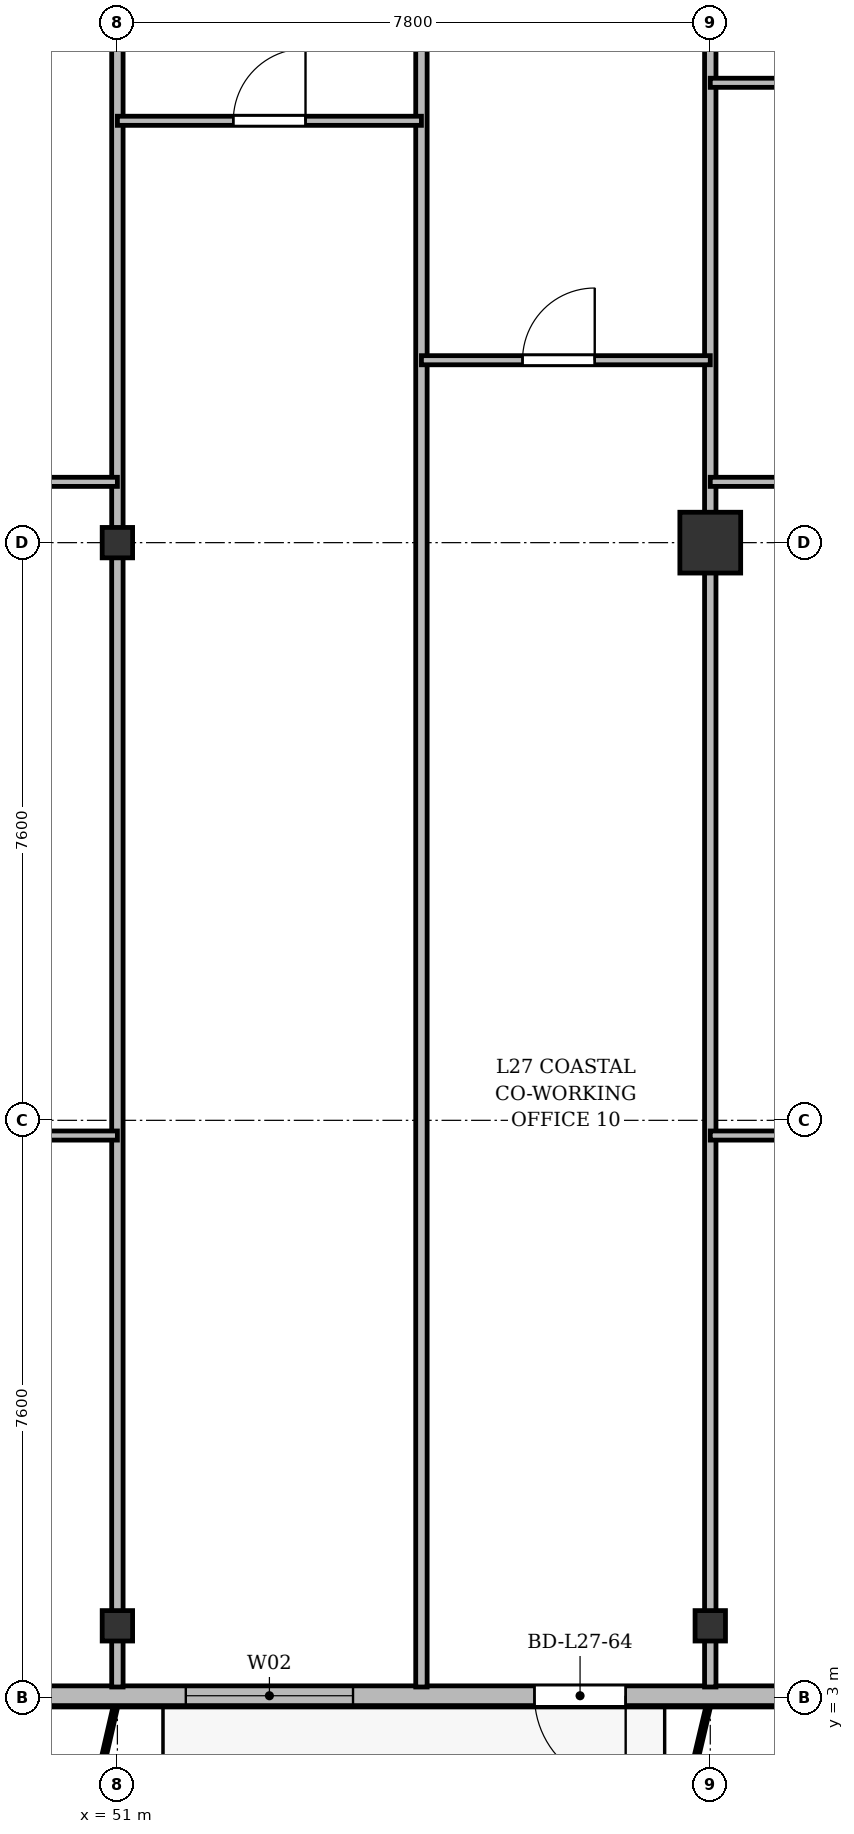
"""IFC4 building model, lengths in metres.
Left out: names, types, materials, properties, quantities, classifications, styles, units other than length and angle.
Written with IfcOpenShell. Run it as: python <this file> out.ifc"""

import sys

from ifc_helpers import new_model, si_unit, direction, frame, frame_2d, origin, origin_2d, place, context, subcontext, project, spatial, rectangle, i_section, extrude, source, transform, mapped, element, fill, save


model = new_model("IFC4")
c1 = context("Model", 3, precision=1e-05, world=origin(), true_north=direction((0.0, 1.0)))
c2 = subcontext(c1, "Body", "Model", "MODEL_VIEW")
j1 = project(units=[si_unit("LENGTHUNIT", "METRE"), si_unit("PLANEANGLEUNIT", "RADIAN")], contexts=[c1])
p1 = place(None, origin())
s1 = spatial("IfcSite", under=j1, at=p1, CompositionType="ELEMENT")
p2 = place(p1, origin())
s2 = spatial("IfcBuilding", under=s1, at=p2, CompositionType="ELEMENT")
p3 = place(p2, frame((0.0, 0.0, 106.9)))
s3 = spatial("IfcBuildingStorey", under=s2, at=p3, CompositionType="ELEMENT", Elevation=106.9)
m1 = source(origin(), c2, "Body", "SweptSolid", [
    extrude(i_section(OverallWidth=0.4, OverallDepth=0.4, WebThickness=0.022, FlangeThickness=0.035, at=origin_2d()), origin(), (0.0, 0.0, 1.0), 3.6),
])
for number, where, z_axis, x_axis in (
    (1, (51.0, 3.95, 0.0), (0.0, 0.0, 1.0), (1.0, 0.0, 0.0)),
    (2, (51.0, 18.2, 0.0), (0.0, 0.0, 1.0), (1.0, 0.0, 0.0)),
    (3, (58.8, 3.95, 0.0), (0.0, 0.0, 1.0), (1.0, 0.0, 0.0)),
):
    element("IfcColumn", number, at=place(p3, frame(where, z_axis=z_axis, x_axis=x_axis)), inside=s3, PredefinedType="COLUMN", context=c2, shape_type="MappedRepresentation", body=[
        mapped(m1, transform((0.0, 0.0, 0.0), x_axis=(1.0, 0.0, 0.0), y_axis=(0.0, 1.0, 0.0), z_axis=(0.0, 0.0, 1.0), scale=1.0)),
    ])
m2 = source(origin(), c2, "Body", "SweptSolid", [
    extrude(rectangle(XDim=0.8, YDim=0.8, at=origin_2d()), origin(), (0.0, 0.0, 1.0), 3.6),
])
p4 = place(p3, frame((58.8, 18.2, 0.0), z_axis=(0.0, 0.0, 1.0), x_axis=(1.0, 0.0, 0.0)))
e4 = element("IfcColumn", 4, at=p4, inside=s3, PredefinedType="COLUMN", context=c2, shape_type="MappedRepresentation", body=[
    mapped(m2, transform((0.0, 0.0, 0.0), x_axis=(1.0, 0.0, 0.0), y_axis=(0.0, 1.0, 0.0), z_axis=(0.0, 0.0, 1.0), scale=1.0)),
])
p5 = place(p3, frame((66.9, 3.03, 0.0), z_axis=(0.0, 0.0, 1.0), x_axis=(-1.0, 0.0, 0.0)))
e5 = element("IfcWall", 5, at=p5, inside=s3, PredefinedType="SOLIDWALL", context=c2, shape_type="SweptSolid", body=[
    extrude(rectangle(XDim=59.4, YDim=0.26, at=frame_2d((29.7, 0.0))), origin(), (0.0, 0.0, 1.0), 3.34),
])
p6 = place(p5, frame((2.0, 0.0, 0.9)))
e6 = element("IfcOpeningElement", 6, at=p6, cuts=e5, PredefinedType="OPENING", context=c2, shape_type="SweptSolid", body=[
    extrude(rectangle(XDim=2.0, YDim=1.95, at=frame_2d((1.0, 0.975))), frame((0.0, 0.14, 0.0), z_axis=(0.0, -1.0, 0.0), x_axis=(1.0, 0.0, 0.0)), (0.0, 0.0, 1.0), 0.28),
])
p7 = place(p5, frame((5.575, 0.0, 0.9)))
e7 = element("IfcOpeningElement", 7, at=p7, cuts=e5, PredefinedType="OPENING", context=c2, shape_type="SweptSolid", body=[
    extrude(rectangle(XDim=1.65, YDim=1.85, at=frame_2d((0.825, 0.925))), frame((0.0, 0.14, 0.0), z_axis=(0.0, -1.0, 0.0), x_axis=(1.0, 0.0, 0.0)), (0.0, 0.0, 1.0), 0.28),
])
p8 = place(p5, frame((9.213, 0.0, 0.0)))
e8 = element("IfcOpeningElement", 8, at=p8, cuts=e5, PredefinedType="OPENING", context=c2, shape_type="SweptSolid", body=[
    extrude(rectangle(XDim=1.2, YDim=2.2, at=frame_2d((0.6, 1.1))), frame((0.0, 0.14, 0.0), z_axis=(0.0, -1.0, 0.0), x_axis=(1.0, 0.0, 0.0)), (0.0, 0.0, 1.0), 0.28),
])
p9 = place(p5, frame((12.8, 0.0, 0.9)))
e9 = element("IfcOpeningElement", 9, at=p9, cuts=e5, PredefinedType="OPENING", context=c2, shape_type="SweptSolid", body=[
    extrude(rectangle(XDim=2.2, YDim=1.8, at=frame_2d((1.1, 0.9))), frame((0.0, 0.14, 0.0), z_axis=(0.0, -1.0, 0.0), x_axis=(1.0, 0.0, 0.0)), (0.0, 0.0, 1.0), 0.28),
])
p10 = place(p5, frame((16.95, 0.0, 0.9)))
e10 = element("IfcOpeningElement", 10, at=p10, cuts=e5, PredefinedType="OPENING", context=c2, shape_type="SweptSolid", body=[
    extrude(rectangle(XDim=1.5, YDim=1.75, at=frame_2d((0.75, 0.875))), frame((0.0, 0.14, 0.0), z_axis=(0.0, -1.0, 0.0), x_axis=(1.0, 0.0, 0.0)), (0.0, 0.0, 1.0), 0.28),
])
p11 = place(p5, frame((20.3, 0.0, 0.9)))
e11 = element("IfcOpeningElement", 11, at=p11, cuts=e5, PredefinedType="OPENING", context=c2, shape_type="SweptSolid", body=[
    extrude(rectangle(XDim=2.0, YDim=1.95, at=frame_2d((1.0, 0.975))), frame((0.0, 0.14, 0.0), z_axis=(0.0, -1.0, 0.0), x_axis=(1.0, 0.0, 0.0)), (0.0, 0.0, 1.0), 0.28),
])
p12 = place(p5, frame((25.575, 0.0, 0.9)))
e12 = element("IfcOpeningElement", 12, at=p12, cuts=e5, PredefinedType="OPENING", context=c2, shape_type="SweptSolid", body=[
    extrude(rectangle(XDim=1.65, YDim=1.85, at=frame_2d((0.825, 0.925))), frame((0.0, 0.14, 0.0), z_axis=(0.0, -1.0, 0.0), x_axis=(1.0, 0.0, 0.0)), (0.0, 0.0, 1.0), 0.28),
])
p13 = place(p5, frame((32.1, 0.0, 0.9)))
e13 = element("IfcOpeningElement", 13, at=p13, cuts=e5, PredefinedType="OPENING", context=c2, shape_type="SweptSolid", body=[
    extrude(rectangle(XDim=1.8, YDim=1.8, at=frame_2d((0.9, 0.9))), frame((0.0, 0.14, 0.0), z_axis=(0.0, -1.0, 0.0), x_axis=(1.0, 0.0, 0.0)), (0.0, 0.0, 1.0), 0.28),
])
p14 = place(p5, frame((37.584, 0.0, 0.0)))
e14 = element("IfcOpeningElement", 14, at=p14, cuts=e5, PredefinedType="OPENING", context=c2, shape_type="SweptSolid", body=[
    extrude(rectangle(XDim=1.2, YDim=2.2, at=frame_2d((0.6, 1.1))), frame((0.0, 0.14, 0.0), z_axis=(0.0, -1.0, 0.0), x_axis=(1.0, 0.0, 0.0)), (0.0, 0.0, 1.0), 0.28),
])
p15 = place(p5, frame((40.85, 0.0, 0.9)))
e15 = element("IfcOpeningElement", 15, at=p15, cuts=e5, PredefinedType="OPENING", context=c2, shape_type="SweptSolid", body=[
    extrude(rectangle(XDim=1.5, YDim=1.75, at=frame_2d((0.75, 0.875))), frame((0.0, 0.14, 0.0), z_axis=(0.0, -1.0, 0.0), x_axis=(1.0, 0.0, 0.0)), (0.0, 0.0, 1.0), 0.28),
])
p16 = place(p5, frame((46.4, 0.0, 0.9)))
e16 = element("IfcOpeningElement", 16, at=p16, cuts=e5, PredefinedType="OPENING", context=c2, shape_type="SweptSolid", body=[
    extrude(rectangle(XDim=2.0, YDim=1.95, at=frame_2d((1.0, 0.975))), frame((0.0, 0.14, 0.0), z_axis=(0.0, -1.0, 0.0), x_axis=(1.0, 0.0, 0.0)), (0.0, 0.0, 1.0), 0.28),
])
p17 = place(p5, frame((55.817, 0.0, 0.0)))
e17 = element("IfcOpeningElement", 17, at=p17, cuts=e5, PredefinedType="OPENING", context=c2, shape_type="SweptSolid", body=[
    extrude(rectangle(XDim=1.2, YDim=2.2, at=frame_2d((0.6, 1.1))), frame((0.0, 0.14, 0.0), z_axis=(0.0, -1.0, 0.0), x_axis=(1.0, 0.0, 0.0)), (0.0, 0.0, 1.0), 0.28),
])
p18 = place(p3, frame((51.0, 3.145, 0.0), z_axis=(0.0, 0.0, 1.0), x_axis=(0.0, 1.0, 0.0)))
e18 = element("IfcWall", 18, at=p18, inside=s3, PredefinedType="PARTITIONING", context=c2, shape_type="SweptSolid", body=[
    extrude(rectangle(XDim=24.455, YDim=0.15, at=frame_2d((12.228, 0.0))), origin(), (0.0, 0.0, 1.0), 2.84),
])
p19 = place(p3, frame((55.0, 3.145, 0.0), z_axis=(0.0, 0.0, 1.0), x_axis=(0.0, 1.0, 0.0)))
e19 = element("IfcWall", 19, at=p19, inside=s3, PredefinedType="PARTITIONING", context=c2, shape_type="SweptSolid", body=[
    extrude(rectangle(XDim=24.455, YDim=0.15, at=frame_2d((12.228, 0.0))), origin(), (0.0, 0.0, 1.0), 2.752),
])
p20 = place(p3, frame((58.8, 3.145, 0.0), z_axis=(0.0, 0.0, 1.0), x_axis=(0.0, 1.0, 0.0)))
e20 = element("IfcWall", 20, at=p20, inside=s3, PredefinedType="PARTITIONING", context=c2, shape_type="SweptSolid", body=[
    extrude(rectangle(XDim=24.455, YDim=0.15, at=frame_2d((12.228, 0.0))), origin(), (0.0, 0.0, 1.0), 2.84),
])
p21 = place(p3, frame((43.8, 19.0, 0.0), z_axis=(0.0, 0.0, 1.0), x_axis=(1.0, 0.0, 0.0)))
e21 = element("IfcWall", 21, at=p21, inside=s3, PredefinedType="PARTITIONING", context=c2, shape_type="SweptSolid", body=[
    extrude(rectangle(XDim=7.2, YDim=0.12, at=frame_2d((3.6, 0.0))), origin(), (0.0, 0.0, 1.0), 2.84),
])
p22 = place(p21, frame((3.125, 0.0, 0.0)))
e22 = element("IfcOpeningElement", 22, at=p22, cuts=e21, PredefinedType="OPENING", context=c2, shape_type="SweptSolid", body=[
    extrude(rectangle(XDim=0.95, YDim=2.15, at=frame_2d((0.475, 1.075))), frame((0.0, 0.07, 0.0), z_axis=(0.0, -1.0, 0.0), x_axis=(1.0, 0.0, 0.0)), (0.0, 0.0, 1.0), 0.14),
])
p23 = place(p3, frame((47.4, 10.4, 0.0), z_axis=(0.0, 0.0, 1.0), x_axis=(1.0, 0.0, 0.0)))
e23 = element("IfcWall", 23, at=p23, inside=s3, PredefinedType="PARTITIONING", context=c2, shape_type="SweptSolid", body=[
    extrude(rectangle(XDim=3.6, YDim=0.12, at=frame_2d((1.8, 0.0))), origin(), (0.0, 0.0, 1.0), 2.84),
])
p24 = place(p23, frame((1.325, 0.0, 0.0)))
e24 = element("IfcOpeningElement", 24, at=p24, cuts=e23, PredefinedType="OPENING", context=c2, shape_type="SweptSolid", body=[
    extrude(rectangle(XDim=0.95, YDim=2.15, at=frame_2d((0.475, 1.075))), frame((0.0, 0.07, 0.0), z_axis=(0.0, -1.0, 0.0), x_axis=(1.0, 0.0, 0.0)), (0.0, 0.0, 1.0), 0.14),
])
p25 = place(p3, frame((51.0, 23.75, 0.0), z_axis=(0.0, 0.0, 1.0), x_axis=(1.0, 0.0, 0.0)))
e25 = element("IfcWall", 25, at=p25, inside=s3, PredefinedType="PARTITIONING", context=c2, shape_type="SweptSolid", body=[
    extrude(rectangle(XDim=4.0, YDim=0.12, at=frame_2d((2.0, 0.0))), origin(), (0.0, 0.0, 1.0), 2.84),
])
p26 = place(p25, frame((1.525, 0.0, 0.0)))
e26 = element("IfcOpeningElement", 26, at=p26, cuts=e25, PredefinedType="OPENING", context=c2, shape_type="SweptSolid", body=[
    extrude(rectangle(XDim=0.95, YDim=2.15, at=frame_2d((0.475, 1.075))), frame((0.0, 0.07, 0.0), z_axis=(0.0, -1.0, 0.0), x_axis=(1.0, 0.0, 0.0)), (0.0, 0.0, 1.0), 0.14),
])
p27 = place(p3, frame((55.0, 20.6, 0.0), z_axis=(0.0, 0.0, 1.0), x_axis=(1.0, 0.0, 0.0)))
e27 = element("IfcWall", 27, at=p27, inside=s3, PredefinedType="PARTITIONING", context=c2, shape_type="SweptSolid", body=[
    extrude(rectangle(XDim=3.8, YDim=0.12, at=frame_2d((1.9, 0.0))), origin(), (0.0, 0.0, 1.0), 2.84),
])
p28 = place(p27, frame((1.33, 0.0, 0.0)))
e28 = element("IfcOpeningElement", 28, at=p28, cuts=e27, PredefinedType="OPENING", context=c2, shape_type="SweptSolid", body=[
    extrude(rectangle(XDim=0.95, YDim=2.15, at=frame_2d((0.475, 1.075))), frame((0.0, 0.07, 0.0), z_axis=(0.0, -1.0, 0.0), x_axis=(1.0, 0.0, 0.0)), (0.0, 0.0, 1.0), 0.14),
])
p29 = place(p3, frame((58.8, 19.0, 0.0), z_axis=(0.0, 0.0, 1.0), x_axis=(1.0, 0.0, 0.0)))
e29 = element("IfcWall", 29, at=p29, inside=s3, PredefinedType="PARTITIONING", context=c2, shape_type="SweptSolid", body=[
    extrude(rectangle(XDim=6.8, YDim=0.12, at=frame_2d((3.4, 0.0))), origin(), (0.0, 0.0, 1.0), 2.84),
])
p30 = place(p29, frame((2.925, 0.0, 0.0)))
e30 = element("IfcOpeningElement", 30, at=p30, cuts=e29, PredefinedType="OPENING", context=c2, shape_type="SweptSolid", body=[
    extrude(rectangle(XDim=0.95, YDim=2.15, at=frame_2d((0.475, 1.075))), frame((0.0, 0.07, 0.0), z_axis=(0.0, -1.0, 0.0), x_axis=(1.0, 0.0, 0.0)), (0.0, 0.0, 1.0), 0.14),
])
p31 = place(p3, frame((58.8, 24.25, 0.0), z_axis=(0.0, 0.0, 1.0), x_axis=(1.0, 0.0, 0.0)))
e31 = element("IfcWall", 31, at=p31, inside=s3, PredefinedType="PARTITIONING", context=c2, shape_type="SweptSolid", body=[
    extrude(rectangle(XDim=2.362, YDim=0.12, at=frame_2d((1.181, 0.0))), origin(), (0.0, 0.0, 1.0), 2.84),
])
p32 = place(p3, frame((58.8, 10.4, 0.0), z_axis=(0.0, 0.0, 1.0), x_axis=(1.0, 0.0, 0.0)))
e32 = element("IfcWall", 32, at=p32, inside=s3, PredefinedType="PARTITIONING", context=c2, shape_type="SweptSolid", body=[
    extrude(rectangle(XDim=3.4, YDim=0.12, at=frame_2d((1.7, 0.0))), origin(), (0.0, 0.0, 1.0), 2.84),
])
p33 = place(p32, frame((1.131, 0.0, 0.0)))
e33 = element("IfcOpeningElement", 33, at=p33, cuts=e32, PredefinedType="OPENING", context=c2, shape_type="SweptSolid", body=[
    extrude(rectangle(XDim=0.95, YDim=2.15, at=frame_2d((0.475, 1.075))), frame((0.0, 0.07, 0.0), z_axis=(0.0, -1.0, 0.0), x_axis=(1.0, 0.0, 0.0)), (0.0, 0.0, 1.0), 0.14),
])
m3 = source(origin(), c2, "Body", "SweptSolid", [
    extrude(rectangle(XDim=1.2, YDim=2.2, at=frame_2d((0.6, 1.1))), frame((0.0, 0.025, 0.0), z_axis=(0.0, -1.0, 0.0), x_axis=(1.0, 0.0, 0.0)), (0.0, 0.0, 1.0), 0.05),
])
p34 = place(p8, origin())
e34 = element("IfcDoor", 34, at=p34, inside=s3, OperationType="SINGLE_SWING_LEFT", PredefinedType="DOOR", context=c2, shape_type="MappedRepresentation", body=[
    mapped(m3, transform((0.0, 0.0, 0.0), x_axis=(1.0, 0.0, 0.0), y_axis=(0.0, 1.0, 0.0), z_axis=(0.0, 0.0, 1.0), scale=1.0)),
])
fill(e8, e34)
m4 = source(origin(), c2, "Body", "SweptSolid", [
    extrude(rectangle(XDim=2.2, YDim=1.8, at=frame_2d((1.1, 0.9))), frame((0.0, 0.03, 0.0), z_axis=(0.0, -1.0, 0.0), x_axis=(1.0, 0.0, 0.0)), (0.0, 0.0, 1.0), 0.06),
])
p35 = place(p9, origin())
e35 = element("IfcWindow", 35, at=p35, inside=s3, PartitioningType="SINGLE_PANEL", PredefinedType="WINDOW", context=c2, shape_type="MappedRepresentation", body=[
    mapped(m4, transform((0.0, 0.0, 0.0), x_axis=(1.0, 0.0, 0.0), y_axis=(0.0, 1.0, 0.0), z_axis=(0.0, 0.0, 1.0), scale=1.0)),
])
fill(e9, e35)
m5 = source(origin(), c2, "Body", "SweptSolid", [
    extrude(rectangle(XDim=0.95, YDim=2.15, at=frame_2d((0.475, 1.075))), frame((0.0, 0.025, 0.0), z_axis=(0.0, -1.0, 0.0), x_axis=(1.0, 0.0, 0.0)), (0.0, 0.0, 1.0), 0.05),
])
p36 = place(p26, origin())
e36 = element("IfcDoor", 36, at=p36, inside=s3, OperationType="SINGLE_SWING_RIGHT", PredefinedType="DOOR", context=c2, shape_type="MappedRepresentation", body=[
    mapped(m5, transform((0.0, 0.0, 0.0), x_axis=(1.0, 0.0, 0.0), y_axis=(0.0, 1.0, 0.0), z_axis=(0.0, 0.0, 1.0), scale=1.0)),
])
fill(e26, e36)
p37 = place(p28, origin())
e37 = element("IfcDoor", 37, at=p37, inside=s3, OperationType="SINGLE_SWING_RIGHT", PredefinedType="DOOR", context=c2, shape_type="MappedRepresentation", body=[
    mapped(m5, transform((0.0, 0.0, 0.0), x_axis=(1.0, 0.0, 0.0), y_axis=(0.0, 1.0, 0.0), z_axis=(0.0, 0.0, 1.0), scale=1.0)),
])
fill(e28, e37)
save(model, sys.argv[1])
